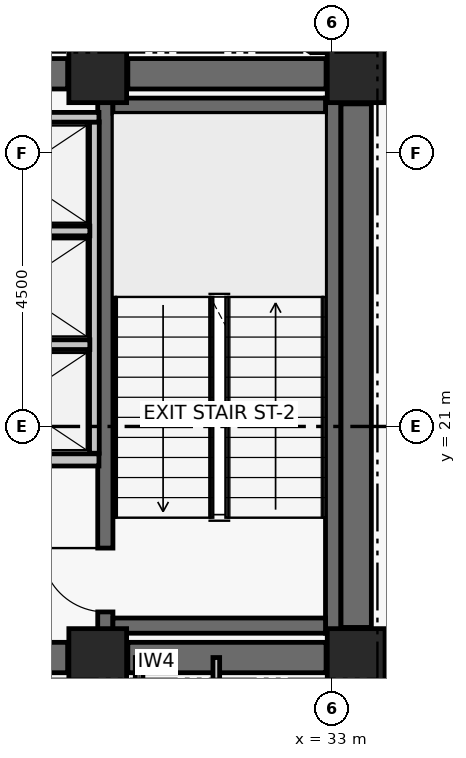
"""IFC4 building model, lengths in metres.
Left out: names, types, materials, properties, quantities, classifications, styles, units other than length and angle.
Written with IfcOpenShell. Run it as: python <this file> out.ifc"""

import sys

from ifc_helpers import new_model, si_unit, direction, frame, frame_2d, origin, origin_2d, place, context, subcontext, project, spatial, rectangle, extrude, element, fill, save


model = new_model("IFC4")
c1 = context("Model", 3, precision=1e-05, world=origin(), true_north=direction((0.0, 1.0)))
c2 = subcontext(c1, "Body", "Model", "MODEL_VIEW")
j1 = project(units=[si_unit("LENGTHUNIT", "METRE"), si_unit("PLANEANGLEUNIT", "RADIAN")], contexts=[c1])
p1 = place(None, origin())
s1 = spatial("IfcSite", under=j1, at=p1, CompositionType="ELEMENT")
p2 = place(p1, origin())
s2 = spatial("IfcBuilding", under=s1, at=p2, CompositionType="ELEMENT")
p3 = place(p2, frame((0.0, 0.0, 191.52)))
s3 = spatial("IfcBuildingStorey", under=s2, at=p3, CompositionType="ELEMENT", Elevation=191.52)
for number, where, z_axis, x_axis in (
    (1, (29.15, 17.2, 0.0), (0.0, 0.0, 1.0), (1.0, 0.0, 0.0)),
    (2, (33.4, 17.2, 0.0), (0.0, 0.0, 1.0), (1.0, 0.0, 0.0)),
    (3, (29.15, 26.8, 0.0), (0.0, 0.0, 1.0), (1.0, 0.0, 0.0)),
    (4, (33.4, 26.8, 0.0), (0.0, 0.0, 1.0), (1.0, 0.0, 0.0)),
):
    element("IfcColumn", number, at=place(p3, frame(where, z_axis=z_axis, x_axis=x_axis)), inside=s3, PredefinedType="COLUMN", context=c2, shape_type="SweptSolid", body=[
        extrude(rectangle(XDim=0.95, YDim=0.95, at=origin_2d()), origin(), (0.0, 0.0, 1.0), 3.72),
    ])
p4 = place(p3, frame((26.85, 17.2, 0.0), z_axis=(0.0, 0.0, 1.0), x_axis=(1.0, 0.0, 0.0)))
e5 = element("IfcWall", 5, at=p4, inside=s3, PredefinedType="SHEAR", context=c2, shape_type="SweptSolid", body=[
    extrude(rectangle(XDim=1.805, YDim=0.5, at=frame_2d((0.902, 0.0))), origin(), (0.0, 0.0, 1.0), 3.44),
])
p5 = place(p3, frame((29.645, 17.2, 0.0), z_axis=(0.0, 0.0, 1.0), x_axis=(1.0, 0.0, 0.0)))
e6 = element("IfcWall", 6, at=p5, inside=s3, PredefinedType="SHEAR", context=c2, shape_type="SweptSolid", body=[
    extrude(rectangle(XDim=3.26, YDim=0.5, at=frame_2d((1.63, 0.0))), origin(), (0.0, 0.0, 1.0), 3.44),
])
p6 = place(p3, frame((26.85, 26.8, 0.0), z_axis=(0.0, 0.0, 1.0), x_axis=(1.0, 0.0, 0.0)))
e7 = element("IfcWall", 7, at=p6, inside=s3, PredefinedType="SHEAR", context=c2, shape_type="SweptSolid", body=[
    extrude(rectangle(XDim=1.805, YDim=0.5, at=frame_2d((0.902, 0.0))), origin(), (0.0, 0.0, 1.0), 3.44),
])
p7 = place(p3, frame((29.645, 26.8, 0.0), z_axis=(0.0, 0.0, 1.0), x_axis=(1.0, 0.0, 0.0)))
e8 = element("IfcWall", 8, at=p7, inside=s3, PredefinedType="SHEAR", context=c2, shape_type="SweptSolid", body=[
    extrude(rectangle(XDim=3.26, YDim=0.5, at=frame_2d((1.63, 0.0))), origin(), (0.0, 0.0, 1.0), 3.44),
])
p8 = place(p3, frame((33.4, 17.695, 0.0), z_axis=(0.0, 0.0, 1.0), x_axis=(0.0, 1.0, 0.0)))
e9 = element("IfcWall", 9, at=p8, inside=s3, PredefinedType="SHEAR", context=c2, shape_type="SweptSolid", body=[
    extrude(rectangle(XDim=8.61, YDim=0.5, at=frame_2d((4.305, 0.0))), origin(), (0.0, 0.0, 1.0), 3.44),
])
p9 = place(p3, frame((29.275, 17.6, 0.0), z_axis=(0.0, 0.0, 1.0), x_axis=(0.0, 1.0, 0.0)))
e10 = element("IfcWall", 10, at=p9, inside=s3, PredefinedType="SHEAR", context=c2, shape_type="SweptSolid", body=[
    extrude(rectangle(XDim=8.8, YDim=0.25, at=frame_2d((4.4, 0.0))), origin(), (0.0, 0.0, 1.0), 3.44),
])
p10 = place(p9, frame((0.35, 0.0, 0.0)))
e11 = element("IfcOpeningElement", 11, at=p10, cuts=e10, PredefinedType="OPENING", context=c2, shape_type="SweptSolid", body=[
    extrude(rectangle(XDim=1.05, YDim=2.08, at=frame_2d((0.525, 1.04))), frame((0.0, 0.135, 0.0), z_axis=(0.0, -1.0, 0.0), x_axis=(1.0, 0.0, 0.0)), (0.0, 0.0, 1.0), 0.27),
])
p11 = place(p3, frame((33.021, 17.6, 0.0), z_axis=(0.0, 0.0, 1.0), x_axis=(0.0, 1.0, 0.0)))
e12 = element("IfcWall", 12, at=p11, inside=s3, PredefinedType="SHEAR", context=c2, shape_type="SweptSolid", body=[
    extrude(rectangle(XDim=8.8, YDim=0.25, at=frame_2d((4.4, 0.0))), origin(), (0.0, 0.0, 1.0), 3.44),
])
for number, where, z_axis, x_axis in (
    (13, (29.4, 17.725, 0.0), (0.0, 0.0, 1.0), (1.0, 0.0, 0.0)),
    (14, (29.4, 26.275, 0.0), (0.0, 0.0, 1.0), (1.0, 0.0, 0.0)),
):
    element("IfcWall", number, at=place(p3, frame(where, z_axis=z_axis, x_axis=x_axis)), inside=s3, PredefinedType="SHEAR", context=c2, shape_type="SweptSolid", body=[
        extrude(rectangle(XDim=3.496, YDim=0.25, at=frame_2d((1.748, 0.0))), origin(), (0.0, 0.0, 1.0), 3.44),
    ])
p12 = place(p3, frame((26.37, 20.45, 0.0), z_axis=(0.0, 0.0, 1.0), x_axis=(1.0, 0.0, 0.0)))
e15 = element("IfcWall", 15, at=p12, inside=s3, PredefinedType="PARTITIONING", context=c2, shape_type="SweptSolid", body=[
    extrude(rectangle(XDim=2.8, YDim=0.2, at=frame_2d((1.4, 0.0))), origin(), (0.0, 0.0, 1.0), 3.44),
])
p13 = place(p12, frame((0.78, 0.0, 0.0)))
e16 = element("IfcOpeningElement", 16, at=p13, cuts=e15, PredefinedType="OPENING", context=c2, shape_type="SweptSolid", body=[
    extrude(rectangle(XDim=1.1, YDim=2.08, at=frame_2d((0.55, 1.04))), frame((0.0, 0.11, 0.0), z_axis=(0.0, -1.0, 0.0), x_axis=(1.0, 0.0, 0.0)), (0.0, 0.0, 1.0), 0.22),
])
p14 = place(p3, frame((29.095, 20.56, 0.0), z_axis=(0.0, 0.0, 1.0), x_axis=(0.0, 1.0, 0.0)))
e17 = element("IfcWall", 17, at=p14, inside=s3, PredefinedType="PARTITIONING", context=c2, shape_type="SweptSolid", body=[
    extrude(rectangle(XDim=5.45, YDim=0.16, at=frame_2d((2.725, 0.0))), origin(), (0.0, 0.0, 1.0), 3.44),
])
p15 = place(p3, frame((26.37, 22.345, 0.0), z_axis=(0.0, 0.0, 1.0), x_axis=(1.0, 0.0, 0.0)))
e18 = element("IfcWall", 18, at=p15, inside=s3, PredefinedType="PARTITIONING", context=c2, shape_type="SweptSolid", body=[
    extrude(rectangle(XDim=2.65, YDim=0.16, at=frame_2d((1.325, 0.0))), origin(), (0.0, 0.0, 1.0), 3.44),
])
p16 = place(p3, frame((26.53, 24.215, 0.0), z_axis=(0.0, 0.0, 1.0), x_axis=(1.0, 0.0, 0.0)))
e19 = element("IfcWall", 19, at=p16, inside=s3, PredefinedType="PARTITIONING", context=c2, shape_type="SweptSolid", body=[
    extrude(rectangle(XDim=2.49, YDim=0.16, at=frame_2d((1.245, 0.0))), origin(), (0.0, 0.0, 1.0), 3.44),
])
p17 = place(p3, frame((26.34, 26.085, 0.0), z_axis=(0.0, 0.0, 1.0), x_axis=(1.0, 0.0, 0.0)))
e20 = element("IfcWall", 20, at=p17, inside=s3, PredefinedType="PARTITIONING", context=c2, shape_type="SweptSolid", body=[
    extrude(rectangle(XDim=2.83, YDim=0.16, at=frame_2d((1.415, 0.0))), origin(), (0.0, 0.0, 1.0), 3.44),
])
p18 = place(p3, frame((29.83, 14.95, 0.0), z_axis=(0.0, 0.0, 1.0), x_axis=(0.0, 1.0, 0.0)))
e21 = element("IfcWall", 21, at=p18, inside=s3, PredefinedType="PARTITIONING", context=c2, shape_type="SweptSolid", body=[
    extrude(rectangle(XDim=2.25, YDim=0.125, at=frame_2d((1.125, 0.0))), origin(), (0.0, 0.0, 1.0), 2.57),
])
p19 = place(p3, frame((31.1, 14.95, 0.0), z_axis=(0.0, 0.0, 1.0), x_axis=(0.0, 1.0, 0.0)))
e22 = element("IfcWall", 22, at=p19, inside=s3, PredefinedType="PARTITIONING", context=c2, shape_type="SweptSolid", body=[
    extrude(rectangle(XDim=2.25, YDim=0.11, at=frame_2d((1.125, 0.0))), origin(), (0.0, 0.0, 1.0), 2.57),
])
p20 = place(p3, frame((33.74, 27.22, 0.0), z_axis=(0.0, 0.0, 1.0), x_axis=(-1.0, 0.0, 0.0)))
e23 = element("IfcWall", 23, at=p20, inside=s3, PredefinedType="PARTITIONING", context=c2, shape_type="SweptSolid", body=[
    extrude(rectangle(XDim=1.062, YDim=0.145, at=frame_2d((0.531, 0.0))), origin(), (0.0, 0.0, 1.0), 2.57),
])
p21 = place(p10, origin())
e24 = element("IfcDoor", 24, at=p21, inside=s3, OperationType="SINGLE_SWING_RIGHT", PredefinedType="DOOR", context=c2, shape_type="SweptSolid", body=[
    extrude(rectangle(XDim=1.05, YDim=2.08, at=frame_2d((0.525, 1.04))), frame((0.0, 0.025, 0.0), z_axis=(0.0, -1.0, 0.0), x_axis=(1.0, 0.0, 0.0)), (0.0, 0.0, 1.0), 0.05),
])
fill(e11, e24)
save(model, sys.argv[1])
